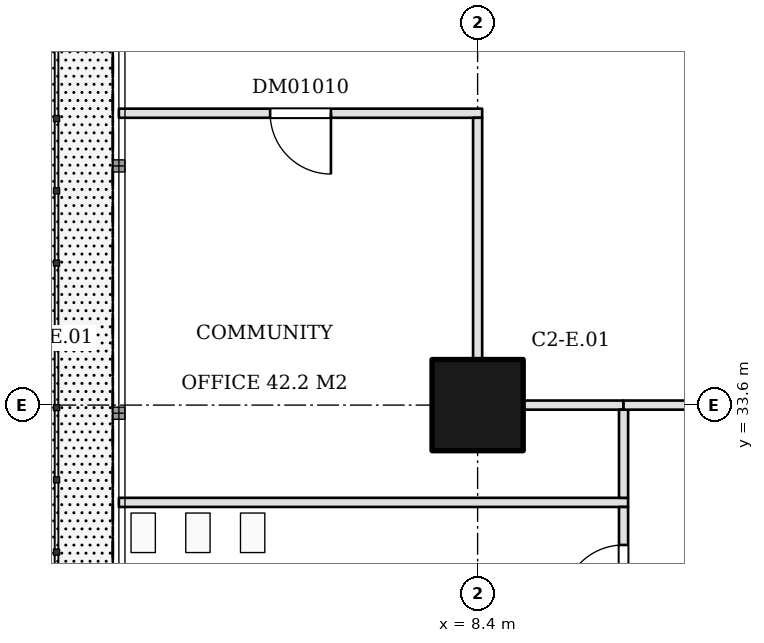
"""IFC4 building model, lengths in metres.
Left out: names, types, materials, properties, quantities, classifications, styles, units other than length and angle.
Written with IfcOpenShell. Run it as: python <this file> out.ifc"""

import sys

from ifc_helpers import new_model, si_unit, direction, frame, frame_2d, origin, origin_2d, place, context, subcontext, project, spatial, rectangle, extrude, element, fill, save


model = new_model("IFC4")
c1 = context("Model", 3, precision=1e-05, world=origin(), true_north=direction((0.0, 1.0)))
c2 = subcontext(c1, "Body", "Model", "MODEL_VIEW")
j1 = project(units=[si_unit("LENGTHUNIT", "METRE"), si_unit("PLANEANGLEUNIT", "RADIAN")], contexts=[c1])
p1 = place(None, origin())
s1 = spatial("IfcSite", under=j1, at=p1, CompositionType="ELEMENT")
p2 = place(p1, origin())
s2 = spatial("IfcBuilding", under=s1, at=p2, CompositionType="ELEMENT")
p3 = place(p2, frame((0.0, 0.0, 9.0)))
s3 = spatial("IfcBuildingStorey", under=s2, at=p3, CompositionType="ELEMENT", Elevation=9.0)
p4 = place(p3, frame((8.4, 33.6, 0.0), z_axis=(0.0, 0.0, 1.0), x_axis=(1.0, 0.0, 0.0)))
e1 = element("IfcColumn", 1, at=p4, inside=s3, PredefinedType="COLUMN", context=c2, shape_type="SweptSolid", body=[
    extrude(rectangle(XDim=1.5, YDim=1.5, at=origin_2d()), origin(), (0.0, 0.0, 1.0), 4.95),
])
p5 = place(p3, frame((2.5, 32.0, 0.0), z_axis=(0.0, 0.0, 1.0), x_axis=(1.0, 0.0, 0.0)))
e2 = element("IfcWall", 2, at=p5, inside=s3, PredefinedType="PARTITIONING", context=c2, shape_type="SweptSolid", body=[
    extrude(rectangle(XDim=8.375, YDim=0.15, at=frame_2d((4.188, 0.0))), origin(), (0.0, 0.0, 1.0), 4.95),
])
p6 = place(p3, frame((2.5, 38.4, 0.0), z_axis=(0.0, 0.0, 1.0), x_axis=(1.0, 0.0, 0.0)))
e3 = element("IfcWall", 3, at=p6, inside=s3, PredefinedType="PARTITIONING", context=c2, shape_type="SweptSolid", body=[
    extrude(rectangle(XDim=5.975, YDim=0.15, at=frame_2d((2.988, 0.0))), origin(), (0.0, 0.0, 1.0), 4.95),
])
p7 = place(p6, frame((2.488, 0.0, 0.0)))
e4 = element("IfcOpeningElement", 4, at=p7, cuts=e3, PredefinedType="OPENING", context=c2, shape_type="SweptSolid", body=[
    extrude(rectangle(XDim=1.0, YDim=2.1, at=frame_2d((0.5, 1.05))), frame((0.0, 0.085, 0.0), z_axis=(0.0, -1.0, 0.0), x_axis=(1.0, 0.0, 0.0)), (0.0, 0.0, 1.0), 0.17),
])
p8 = place(p3, frame((8.4, 34.35, 0.0), z_axis=(0.0, 0.0, 1.0), x_axis=(0.0, 1.0, 0.0)))
e5 = element("IfcWall", 5, at=p8, inside=s3, PredefinedType="PARTITIONING", context=c2, shape_type="SweptSolid", body=[
    extrude(rectangle(XDim=3.975, YDim=0.15, at=frame_2d((1.987, 0.0))), origin(), (0.0, 0.0, 1.0), 4.95),
])
p9 = place(p3, frame((9.15, 33.6, 0.0), z_axis=(0.0, 0.0, 1.0), x_axis=(1.0, 0.0, 0.0)))
e6 = element("IfcWall", 6, at=p9, inside=s3, PredefinedType="PARTITIONING", context=c2, shape_type="SweptSolid", body=[
    extrude(rectangle(XDim=1.65, YDim=0.15, at=frame_2d((0.825, 0.0))), origin(), (0.0, 0.0, 1.0), 4.95),
])
p10 = place(p3, frame((10.8, 29.675, 0.0), z_axis=(0.0, 0.0, 1.0), x_axis=(0.0, 1.0, 0.0)))
e7 = element("IfcWall", 7, at=p10, inside=s3, PredefinedType="PARTITIONING", context=c2, shape_type="SweptSolid", body=[
    extrude(rectangle(XDim=2.25, YDim=0.15, at=frame_2d((1.125, 0.0))), origin(), (0.0, 0.0, 1.0), 4.95),
])
p11 = place(p10, frame((0.625, 0.0, 0.0)))
e8 = element("IfcOpeningElement", 8, at=p11, cuts=e7, PredefinedType="OPENING", context=c2, shape_type="SweptSolid", body=[
    extrude(rectangle(XDim=1.0, YDim=2.1, at=frame_2d((0.5, 1.05))), frame((0.0, 0.085, 0.0), z_axis=(0.0, -1.0, 0.0), x_axis=(1.0, 0.0, 0.0)), (0.0, 0.0, 1.0), 0.17),
])
p12 = place(p3, frame((10.8, 32.075, 0.0), z_axis=(0.0, 0.0, 1.0), x_axis=(0.0, 1.0, 0.0)))
e9 = element("IfcWall", 9, at=p12, inside=s3, PredefinedType="PARTITIONING", context=c2, shape_type="SweptSolid", body=[
    extrude(rectangle(XDim=1.45, YDim=0.15, at=frame_2d((0.725, 0.0))), origin(), (0.0, 0.0, 1.0), 4.95),
])
p13 = place(p3, frame((10.8, 33.6, 0.0), z_axis=(0.0, 0.0, 1.0), x_axis=(1.0, 0.0, 0.0)))
e10 = element("IfcWall", 10, at=p13, inside=s3, PredefinedType="PARTITIONING", context=c2, shape_type="SweptSolid", body=[
    extrude(rectangle(XDim=3.6, YDim=0.15, at=frame_2d((1.8, 0.0))), origin(), (0.0, 0.0, 1.0), 4.95),
])
p14 = place(p11, origin())
e11 = element("IfcDoor", 11, at=p14, inside=s3, OperationType="SINGLE_SWING_LEFT", PredefinedType="DOOR", context=c2, shape_type="SweptSolid", body=[
    extrude(rectangle(XDim=1.0, YDim=2.1, at=frame_2d((0.5, 1.05))), frame((0.0, 0.025, 0.0), z_axis=(0.0, -1.0, 0.0), x_axis=(1.0, 0.0, 0.0)), (0.0, 0.0, 1.0), 0.05),
])
fill(e8, e11)
p15 = place(p7, frame((1.0, 0.0, 0.0), z_axis=(0.0, 0.0, 1.0), x_axis=(-1.0, 0.0, 0.0)))
e12 = element("IfcDoor", 12, at=p15, inside=s3, OperationType="SINGLE_SWING_LEFT", PredefinedType="DOOR", context=c2, shape_type="SweptSolid", body=[
    extrude(rectangle(XDim=1.0, YDim=2.1, at=frame_2d((0.5, 1.05))), frame((0.0, 0.025, 0.0), z_axis=(0.0, -1.0, 0.0), x_axis=(1.0, 0.0, 0.0)), (0.0, 0.0, 1.0), 0.05),
])
fill(e4, e12)
save(model, sys.argv[1])
